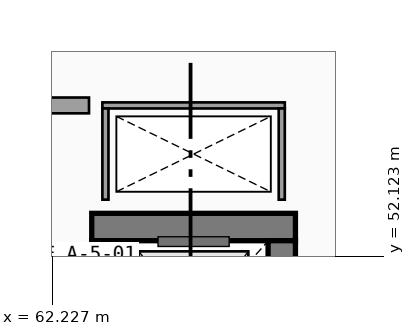
"""IFC4 building model, lengths in metres.
Left out: names, types, materials, properties, quantities, classifications, styles, units other than length and angle.
Written with IfcOpenShell. Run it as: python <this file> out.ifc"""

import sys

from ifc_helpers import new_model, si_unit, direction, frame, frame_2d, origin, place, context, subcontext, project, spatial, rectangle, extrude, element, save


model = new_model("IFC4")
c1 = context("Model", 3, precision=1e-05, world=origin(), true_north=direction((0.0, 1.0)))
c2 = subcontext(c1, "Body", "Model", "MODEL_VIEW")
j1 = project(units=[si_unit("LENGTHUNIT", "METRE"), si_unit("PLANEANGLEUNIT", "RADIAN")], contexts=[c1])
p1 = place(None, origin())
s1 = spatial("IfcSite", under=j1, at=p1, CompositionType="ELEMENT")
p2 = place(p1, origin())
s2 = spatial("IfcBuilding", under=s1, at=p2, CompositionType="ELEMENT")
p3 = place(p2, frame((0.0, 0.0, 23.1)))
s3 = spatial("IfcBuildingStorey", under=s2, at=p3, CompositionType="ELEMENT", Elevation=23.1)
p4 = place(p3, frame((66.225, 52.6, 0.0), z_axis=(0.0, 0.0, 1.0), x_axis=(-1.0, 0.0, 0.0)))
e1 = element("IfcWall", 1, at=p4, inside=s3, PredefinedType="SHEAR", context=c2, shape_type="SweptSolid", body=[
    extrude(rectangle(XDim=3.35, YDim=0.45, at=frame_2d((1.675, 0.0))), origin(), (0.0, 0.0, 1.0), 4.82),
])
p5 = place(p3, frame((63.1, 52.375, 0.0), z_axis=(0.0, 0.0, 1.0), x_axis=(0.0, -1.0, 0.0)))
e2 = element("IfcWall", 2, at=p5, inside=s3, PredefinedType="SHEAR", context=c2, shape_type="SweptSolid", body=[
    extrude(rectangle(XDim=2.75, YDim=0.45, at=frame_2d((1.375, 0.0))), origin(), (0.0, 0.0, 1.0), 4.82),
])
p6 = place(p5, frame((0.725, 0.0, 0.0), z_axis=(0.0, 0.0, 1.0), x_axis=(1.0, 0.0, 0.0)))
e3 = element("IfcOpeningElement", 3, at=p6, cuts=e2, PredefinedType="OPENING", context=c2, shape_type="SweptSolid", body=[
    extrude(rectangle(XDim=1.3, YDim=2.25, at=frame_2d((0.65, 1.125))), frame((0.0, 0.235, 0.0), z_axis=(0.0, -1.0, 0.0), x_axis=(1.0, 0.0, 0.0)), (0.0, 0.0, 1.0), 0.47),
])
p7 = place(p3, frame((66.0, 49.625, 0.0), z_axis=(0.0, 0.0, 1.0), x_axis=(0.0, 1.0, 0.0)))
e4 = element("IfcWall", 4, at=p7, inside=s3, PredefinedType="SHEAR", context=c2, shape_type="SweptSolid", body=[
    extrude(rectangle(XDim=2.75, YDim=0.45, at=frame_2d((1.375, 0.0))), origin(), (0.0, 0.0, 1.0), 4.82),
])
p8 = place(p3, frame((66.05, 54.6, 0.0), z_axis=(0.0, 0.0, 1.0), x_axis=(-1.0, 0.0, 0.0)))
e5 = element("IfcWall", 5, at=p8, inside=s3, PredefinedType="PARTITIONING", context=c2, shape_type="SweptSolid", body=[
    extrude(rectangle(XDim=3.0, YDim=0.1, at=frame_2d((1.5, 0.0))), origin(), (0.0, 0.0, 1.0), 4.82),
])
for number, where, z_axis, x_axis in (
    (6, (63.1, 54.55, 0.0), (0.0, 0.0, 1.0), (0.0, -1.0, 0.0)),
    (7, (66.0, 53.05, 0.0), (0.0, 0.0, 1.0), (0.0, 1.0, 0.0)),
):
    element("IfcWall", number, at=place(p3, frame(where, z_axis=z_axis, x_axis=x_axis)), inside=s3, PredefinedType="PARTITIONING", context=c2, shape_type="SweptSolid", body=[
        extrude(rectangle(XDim=1.5, YDim=0.1, at=frame_2d((0.75, 0.0))), origin(), (0.0, 0.0, 1.0), 4.82),
    ])
p9 = place(p3, frame((62.83, 54.6, 0.0), z_axis=(0.0, 0.0, 1.0), x_axis=(-1.0, 0.0, 0.0)))
e8 = element("IfcWall", 8, at=p9, inside=s3, PredefinedType="SOLIDWALL", context=c2, shape_type="SweptSolid", body=[
    extrude(rectangle(XDim=3.76, YDim=0.26, at=frame_2d((1.88, 0.0))), origin(), (0.0, 0.0, 1.0), 4.82),
])
save(model, sys.argv[1])
